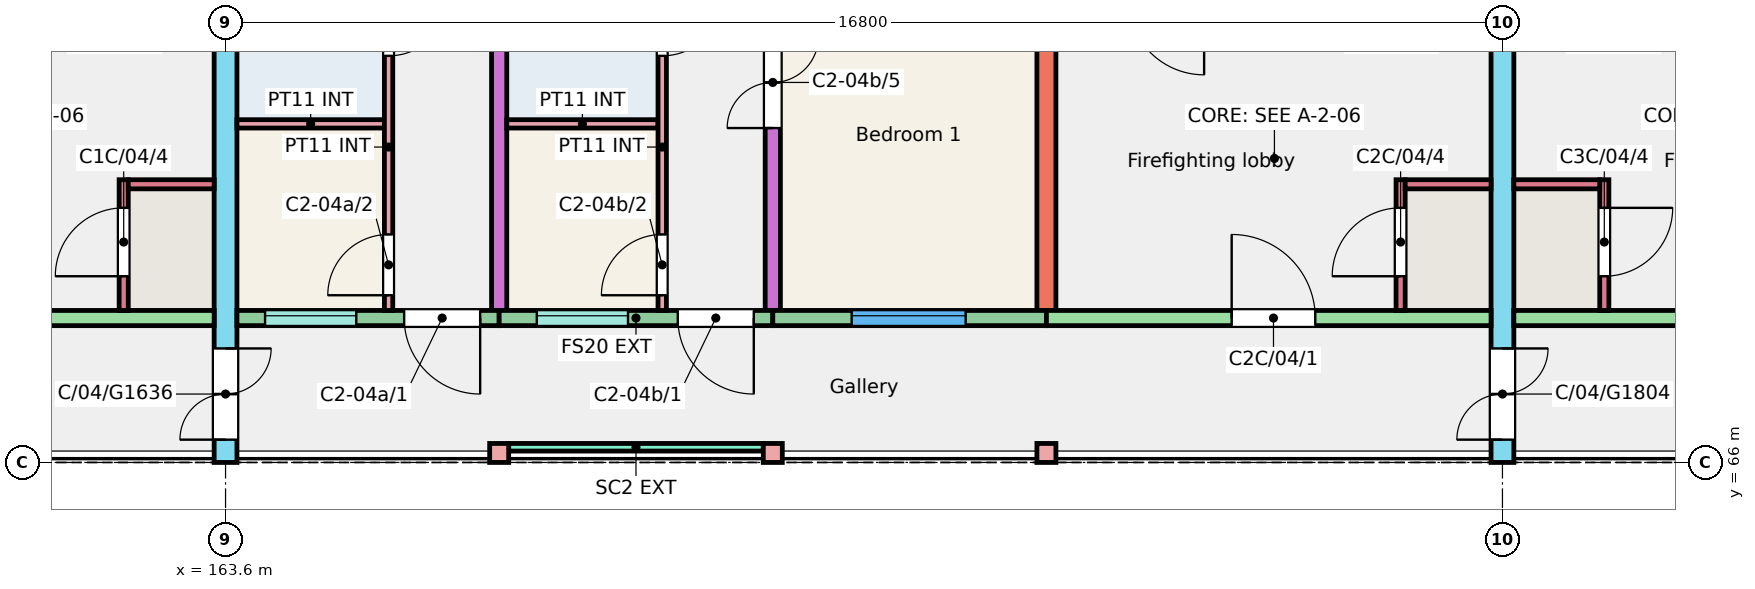
"""IFC4 building model, lengths in metres.
Left out: names, types, materials, properties, quantities, classifications, styles, units other than length and angle.
Written with IfcOpenShell. Run it as: python <this file> out.ifc"""

import sys

from ifc_helpers import new_model, si_unit, direction, frame, frame_2d, origin, origin_2d, place, context, subcontext, project, spatial, rectangle, extrude, element, fill, save


model = new_model("IFC4")
c1 = context("Model", 3, precision=1e-05, world=origin(), true_north=direction((0.0, 1.0)))
c2 = subcontext(c1, "Body", "Model", "MODEL_VIEW")
j1 = project(units=[si_unit("LENGTHUNIT", "METRE"), si_unit("PLANEANGLEUNIT", "RADIAN")], contexts=[c1])
p1 = place(None, origin())
s1 = spatial("IfcSite", under=j1, at=p1, CompositionType="ELEMENT")
p2 = place(p1, origin())
s2 = spatial("IfcBuilding", under=s1, at=p2, CompositionType="ELEMENT")
p3 = place(p2, frame((0.0, 0.0, 12.0)))
s3 = spatial("IfcBuildingStorey", under=s2, at=p3, CompositionType="ELEMENT", Elevation=12.0)
p4 = place(p3, frame((163.6, 66.0, 0.0), z_axis=(0.0, 0.0, 1.0), x_axis=(0.0, 1.0, 0.0)))
e1 = element("IfcWall", 1, at=p4, inside=s3, PredefinedType="SHEAR", context=c2, shape_type="SweptSolid", body=[
    extrude(rectangle(XDim=11.0, YDim=0.3, at=frame_2d((5.5, 0.0))), origin(), (0.0, 0.0, 1.0), 3.0),
])
p5 = place(p4, frame((0.3, 0.0, 0.0)))
e2 = element("IfcOpeningElement", 2, at=p5, cuts=e1, PredefinedType="OPENING", context=c2, shape_type="SweptSolid", body=[
    extrude(rectangle(XDim=1.2, YDim=2.1, at=frame_2d((0.6, 1.05))), frame((0.0, 0.16, 0.0), z_axis=(0.0, -1.0, 0.0), x_axis=(1.0, 0.0, 0.0)), (0.0, 0.0, 1.0), 0.32),
])
p6 = place(p3, frame((167.2, 68.0, 0.0), z_axis=(0.0, 0.0, 1.0), x_axis=(0.0, 1.0, 0.0)))
e3 = element("IfcWall", 3, at=p6, inside=s3, PredefinedType="SHEAR", context=c2, shape_type="SweptSolid", body=[
    extrude(rectangle(XDim=9.0, YDim=0.2, at=frame_2d((4.5, 0.0))), origin(), (0.0, 0.0, 1.0), 3.0),
])
p7 = place(p3, frame((170.8, 68.0, 0.0), z_axis=(0.0, 0.0, 1.0), x_axis=(0.0, 1.0, 0.0)))
e4 = element("IfcWall", 4, at=p7, inside=s3, PredefinedType="SHEAR", context=c2, shape_type="SweptSolid", body=[
    extrude(rectangle(XDim=9.0, YDim=0.2, at=frame_2d((4.5, 0.0))), origin(), (0.0, 0.0, 1.0), 3.0),
])
p8 = place(p7, frame((2.4, 0.0, 0.0)))
e5 = element("IfcOpeningElement", 5, at=p8, cuts=e4, PredefinedType="OPENING", context=c2, shape_type="SweptSolid", body=[
    extrude(rectangle(XDim=1.2, YDim=2.1, at=frame_2d((0.6, 1.05))), frame((0.0, 0.11, 0.0), z_axis=(0.0, -1.0, 0.0), x_axis=(1.0, 0.0, 0.0)), (0.0, 0.0, 1.0), 0.22),
])
p9 = place(p7, frame((6.4, 0.0, 0.0)))
e6 = element("IfcOpeningElement", 6, at=p9, cuts=e4, PredefinedType="OPENING", context=c2, shape_type="SweptSolid", body=[
    extrude(rectangle(XDim=1.2, YDim=2.1, at=frame_2d((0.6, 1.05))), frame((0.0, 0.11, 0.0), z_axis=(0.0, -1.0, 0.0), x_axis=(1.0, 0.0, 0.0)), (0.0, 0.0, 1.0), 0.22),
])
p10 = place(p3, frame((174.4, 68.0, 0.0), z_axis=(0.0, 0.0, 1.0), x_axis=(0.0, 1.0, 0.0)))
e7 = element("IfcWall", 7, at=p10, inside=s3, PredefinedType="SHEAR", context=c2, shape_type="SweptSolid", body=[
    extrude(rectangle(XDim=9.0, YDim=0.25, at=frame_2d((4.5, 0.0))), origin(), (0.0, 0.0, 1.0), 3.0),
])
p11 = place(p3, frame((180.4, 66.0, 0.0), z_axis=(0.0, 0.0, 1.0), x_axis=(0.0, 1.0, 0.0)))
e8 = element("IfcWall", 8, at=p11, inside=s3, PredefinedType="SHEAR", context=c2, shape_type="SweptSolid", body=[
    extrude(rectangle(XDim=11.0, YDim=0.3, at=frame_2d((5.5, 0.0))), origin(), (0.0, 0.0, 1.0), 3.0),
])
p12 = place(p11, frame((0.3, 0.0, 0.0)))
e9 = element("IfcOpeningElement", 9, at=p12, cuts=e8, PredefinedType="OPENING", context=c2, shape_type="SweptSolid", body=[
    extrude(rectangle(XDim=1.2, YDim=2.1, at=frame_2d((0.6, 1.05))), frame((0.0, 0.16, 0.0), z_axis=(0.0, -1.0, 0.0), x_axis=(1.0, 0.0, 0.0)), (0.0, 0.0, 1.0), 0.32),
])
p13 = place(p3, frame((157.6, 67.9, 0.0), z_axis=(0.0, 0.0, 1.0), x_axis=(1.0, 0.0, 0.0)))
e10 = element("IfcWall", 10, at=p13, inside=s3, PredefinedType="SHEAR", context=c2, shape_type="SweptSolid", body=[
    extrude(rectangle(XDim=5.85, YDim=0.2, at=frame_2d((2.925, 0.0))), origin(), (0.0, 0.0, 1.0), 3.0),
])
p14 = place(p13, frame((2.438, 0.0, 0.0)))
e11 = element("IfcOpeningElement", 11, at=p14, cuts=e10, PredefinedType="OPENING", context=c2, shape_type="SweptSolid", body=[
    extrude(rectangle(XDim=1.1, YDim=2.1, at=frame_2d((0.55, 1.05))), frame((0.0, 0.11, 0.0), z_axis=(0.0, -1.0, 0.0), x_axis=(1.0, 0.0, 0.0)), (0.0, 0.0, 1.0), 0.22),
])
p15 = place(p3, frame((162.26, 68.0, 0.0), z_axis=(0.0, 0.0, 1.0), x_axis=(0.0, 1.0, 0.0)))
e12 = element("IfcWall", 12, at=p15, inside=s3, PredefinedType="SHEAR", context=c2, shape_type="SweptSolid", body=[
    extrude(rectangle(XDim=1.72, YDim=0.12, at=frame_2d((0.86, 0.0))), origin(), (0.0, 0.0, 1.0), 3.0),
])
p16 = place(p15, frame((0.45, 0.0, 0.0)))
e13 = element("IfcOpeningElement", 13, at=p16, cuts=e12, PredefinedType="OPENING", context=c2, shape_type="SweptSolid", body=[
    extrude(rectangle(XDim=0.9, YDim=2.1, at=frame_2d((0.45, 1.05))), frame((0.0, 0.07, 0.0), z_axis=(0.0, -1.0, 0.0), x_axis=(1.0, 0.0, 0.0)), (0.0, 0.0, 1.0), 0.14),
])
p17 = place(p3, frame((162.32, 69.66, 0.0), z_axis=(0.0, 0.0, 1.0), x_axis=(1.0, 0.0, 0.0)))
e14 = element("IfcWall", 14, at=p17, inside=s3, PredefinedType="SHEAR", context=c2, shape_type="SweptSolid", body=[
    extrude(rectangle(XDim=1.13, YDim=0.12, at=frame_2d((0.565, 0.0))), origin(), (0.0, 0.0, 1.0), 3.0),
])
p18 = place(p3, frame((163.75, 67.9, 0.0), z_axis=(0.0, 0.0, 1.0), x_axis=(1.0, 0.0, 0.0)))
e15 = element("IfcWall", 15, at=p18, inside=s3, PredefinedType="SOLIDWALL", context=c2, shape_type="SweptSolid", body=[
    extrude(rectangle(XDim=3.45, YDim=0.2, at=frame_2d((1.725, 0.0))), origin(), (0.0, 0.0, 1.0), 3.0),
])
p19 = place(p18, frame((0.37, 0.0, 1.1)))
e16 = element("IfcOpeningElement", 16, at=p19, cuts=e15, PredefinedType="OPENING", context=c2, shape_type="SweptSolid", body=[
    extrude(rectangle(XDim=1.2, YDim=1.3, at=frame_2d((0.6, 0.65))), frame((0.0, 0.11, 0.0), z_axis=(0.0, -1.0, 0.0), x_axis=(1.0, 0.0, 0.0)), (0.0, 0.0, 1.0), 0.22),
])
p20 = place(p18, frame((2.2, 0.0, 0.0)))
e17 = element("IfcOpeningElement", 17, at=p20, cuts=e15, PredefinedType="OPENING", context=c2, shape_type="SweptSolid", body=[
    extrude(rectangle(XDim=1.0, YDim=2.1, at=frame_2d((0.5, 1.05))), frame((0.0, 0.11, 0.0), z_axis=(0.0, -1.0, 0.0), x_axis=(1.0, 0.0, 0.0)), (0.0, 0.0, 1.0), 0.22),
])
p21 = place(p3, frame((167.2, 67.9, 0.0), z_axis=(0.0, 0.0, 1.0), x_axis=(1.0, 0.0, 0.0)))
e18 = element("IfcWall", 18, at=p21, inside=s3, PredefinedType="SOLIDWALL", context=c2, shape_type="SweptSolid", body=[
    extrude(rectangle(XDim=3.6, YDim=0.2, at=frame_2d((1.8, 0.0))), origin(), (0.0, 0.0, 1.0), 3.0),
])
p22 = place(p21, frame((0.495, 0.0, 1.1)))
e19 = element("IfcOpeningElement", 19, at=p22, cuts=e18, PredefinedType="OPENING", context=c2, shape_type="SweptSolid", body=[
    extrude(rectangle(XDim=1.2, YDim=1.3, at=frame_2d((0.6, 0.65))), frame((0.0, 0.11, 0.0), z_axis=(0.0, -1.0, 0.0), x_axis=(1.0, 0.0, 0.0)), (0.0, 0.0, 1.0), 0.22),
])
p23 = place(p21, frame((2.35, 0.0, 0.0)))
e20 = element("IfcOpeningElement", 20, at=p23, cuts=e18, PredefinedType="OPENING", context=c2, shape_type="SweptSolid", body=[
    extrude(rectangle(XDim=1.0, YDim=2.1, at=frame_2d((0.5, 1.05))), frame((0.0, 0.11, 0.0), z_axis=(0.0, -1.0, 0.0), x_axis=(1.0, 0.0, 0.0)), (0.0, 0.0, 1.0), 0.22),
])
p24 = place(p3, frame((170.8, 67.9, 0.0), z_axis=(0.0, 0.0, 1.0), x_axis=(1.0, 0.0, 0.0)))
e21 = element("IfcWall", 21, at=p24, inside=s3, PredefinedType="SOLIDWALL", context=c2, shape_type="SweptSolid", body=[
    extrude(rectangle(XDim=3.6, YDim=0.2, at=frame_2d((1.8, 0.0))), origin(), (0.0, 0.0, 1.0), 3.0),
])
p25 = place(p24, frame((1.038, 0.0, 0.9)))
e22 = element("IfcOpeningElement", 22, at=p25, cuts=e21, PredefinedType="OPENING", context=c2, shape_type="SweptSolid", body=[
    extrude(rectangle(XDim=1.5, YDim=1.5, at=frame_2d((0.75, 0.75))), frame((0.0, 0.11, 0.0), z_axis=(0.0, -1.0, 0.0), x_axis=(1.0, 0.0, 0.0)), (0.0, 0.0, 1.0), 0.22),
])
p26 = place(p3, frame((174.4, 67.9, 0.0), z_axis=(0.0, 0.0, 1.0), x_axis=(1.0, 0.0, 0.0)))
e23 = element("IfcWall", 23, at=p26, inside=s3, PredefinedType="SHEAR", context=c2, shape_type="SweptSolid", body=[
    extrude(rectangle(XDim=5.85, YDim=0.2, at=frame_2d((2.925, 0.0))), origin(), (0.0, 0.0, 1.0), 3.0),
])
p27 = place(p26, frame((2.438, 0.0, 0.0)))
e24 = element("IfcOpeningElement", 24, at=p27, cuts=e23, PredefinedType="OPENING", context=c2, shape_type="SweptSolid", body=[
    extrude(rectangle(XDim=1.1, YDim=2.1, at=frame_2d((0.55, 1.05))), frame((0.0, 0.11, 0.0), z_axis=(0.0, -1.0, 0.0), x_axis=(1.0, 0.0, 0.0)), (0.0, 0.0, 1.0), 0.22),
])
p28 = place(p3, frame((179.06, 68.0, 0.0), z_axis=(0.0, 0.0, 1.0), x_axis=(0.0, 1.0, 0.0)))
e25 = element("IfcWall", 25, at=p28, inside=s3, PredefinedType="SHEAR", context=c2, shape_type="SweptSolid", body=[
    extrude(rectangle(XDim=1.72, YDim=0.12, at=frame_2d((0.86, 0.0))), origin(), (0.0, 0.0, 1.0), 3.0),
])
p29 = place(p28, frame((0.45, 0.0, 0.0)))
e26 = element("IfcOpeningElement", 26, at=p29, cuts=e25, PredefinedType="OPENING", context=c2, shape_type="SweptSolid", body=[
    extrude(rectangle(XDim=0.9, YDim=2.1, at=frame_2d((0.45, 1.05))), frame((0.0, 0.07, 0.0), z_axis=(0.0, -1.0, 0.0), x_axis=(1.0, 0.0, 0.0)), (0.0, 0.0, 1.0), 0.14),
])
p30 = place(p3, frame((179.12, 69.66, 0.0), z_axis=(0.0, 0.0, 1.0), x_axis=(1.0, 0.0, 0.0)))
e27 = element("IfcWall", 27, at=p30, inside=s3, PredefinedType="SHEAR", context=c2, shape_type="SweptSolid", body=[
    extrude(rectangle(XDim=1.13, YDim=0.12, at=frame_2d((0.565, 0.0))), origin(), (0.0, 0.0, 1.0), 3.0),
])
p31 = place(p3, frame((180.55, 67.9, 0.0), z_axis=(0.0, 0.0, 1.0), x_axis=(1.0, 0.0, 0.0)))
e28 = element("IfcWall", 28, at=p31, inside=s3, PredefinedType="SHEAR", context=c2, shape_type="SweptSolid", body=[
    extrude(rectangle(XDim=5.85, YDim=0.2, at=frame_2d((2.925, 0.0))), origin(), (0.0, 0.0, 1.0), 3.0),
])
p32 = place(p31, frame((2.312, 0.0, 0.0)))
e29 = element("IfcOpeningElement", 29, at=p32, cuts=e28, PredefinedType="OPENING", context=c2, shape_type="SweptSolid", body=[
    extrude(rectangle(XDim=1.1, YDim=2.1, at=frame_2d((0.55, 1.05))), frame((0.0, 0.11, 0.0), z_axis=(0.0, -1.0, 0.0), x_axis=(1.0, 0.0, 0.0)), (0.0, 0.0, 1.0), 0.22),
])
p33 = place(p3, frame((181.74, 68.0, 0.0), z_axis=(0.0, 0.0, 1.0), x_axis=(0.0, 1.0, 0.0)))
e30 = element("IfcWall", 30, at=p33, inside=s3, PredefinedType="SHEAR", context=c2, shape_type="SweptSolid", body=[
    extrude(rectangle(XDim=1.72, YDim=0.12, at=frame_2d((0.86, 0.0))), origin(), (0.0, 0.0, 1.0), 3.0),
])
p34 = place(p33, frame((0.45, 0.0, 0.0)))
e31 = element("IfcOpeningElement", 31, at=p34, cuts=e30, PredefinedType="OPENING", context=c2, shape_type="SweptSolid", body=[
    extrude(rectangle(XDim=0.9, YDim=2.1, at=frame_2d((0.45, 1.05))), frame((0.0, 0.07, 0.0), z_axis=(0.0, -1.0, 0.0), x_axis=(1.0, 0.0, 0.0)), (0.0, 0.0, 1.0), 0.14),
])
p35 = place(p3, frame((180.55, 69.66, 0.0), z_axis=(0.0, 0.0, 1.0), x_axis=(1.0, 0.0, 0.0)))
e32 = element("IfcWall", 32, at=p35, inside=s3, PredefinedType="SHEAR", context=c2, shape_type="SweptSolid", body=[
    extrude(rectangle(XDim=1.13, YDim=0.12, at=frame_2d((0.565, 0.0))), origin(), (0.0, 0.0, 1.0), 3.0),
])
for number, where, z_axis, x_axis in (
    (33, (167.2, 66.125, 0.0), (0.0, 0.0, 1.0), (1.0, 0.0, 0.0)),
    (34, (170.8, 66.125, 0.0), (0.0, 0.0, 1.0), (1.0, 0.0, 0.0)),
    (35, (174.4, 66.125, 0.0), (0.0, 0.0, 1.0), (1.0, 0.0, 0.0)),
):
    element("IfcColumn", number, at=place(p3, frame(where, z_axis=z_axis, x_axis=x_axis)), inside=s3, PredefinedType="COLUMN", context=c2, shape_type="SweptSolid", body=[
        extrude(rectangle(XDim=0.25, YDim=0.25, at=origin_2d()), origin(), (0.0, 0.0, 1.0), 3.0),
    ])
p36 = place(p3, frame((167.325, 66.2, 0.0), z_axis=(0.0, 0.0, 1.0), x_axis=(1.0, 0.0, 0.0)))
e36 = element("IfcWall", 36, at=p36, inside=s3, PredefinedType="SOLIDWALL", context=c2, shape_type="SweptSolid", body=[
    extrude(rectangle(XDim=3.35, YDim=0.1, at=frame_2d((1.675, 0.0))), origin(), (0.0, 0.0, 1.0), 2.45),
])
p37 = place(p3, frame((163.75, 70.455, 0.0), z_axis=(0.0, 0.0, 1.0), x_axis=(1.0, 0.0, 0.0)))
e37 = element("IfcWall", 37, at=p37, inside=s3, PredefinedType="PARTITIONING", context=c2, shape_type="SweptSolid", body=[
    extrude(rectangle(XDim=1.94, YDim=0.11, at=frame_2d((0.97, 0.0))), origin(), (0.0, 0.0, 1.0), 2.8),
])
p38 = place(p3, frame((165.745, 68.0, 0.0), z_axis=(0.0, 0.0, 1.0), x_axis=(0.0, 1.0, 0.0)))
e38 = element("IfcWall", 38, at=p38, inside=s3, PredefinedType="PARTITIONING", context=c2, shape_type="SweptSolid", body=[
    extrude(rectangle(XDim=4.3, YDim=0.11, at=frame_2d((2.15, 0.0))), origin(), (0.0, 0.0, 1.0), 2.8),
])
p39 = place(p38, frame((0.2, 0.0, 0.0)))
e39 = element("IfcOpeningElement", 39, at=p39, cuts=e38, PredefinedType="OPENING", context=c2, shape_type="SweptSolid", body=[
    extrude(rectangle(XDim=0.8, YDim=2.1, at=frame_2d((0.4, 1.05))), frame((0.0, 0.065, 0.0), z_axis=(0.0, -1.0, 0.0), x_axis=(1.0, 0.0, 0.0)), (0.0, 0.0, 1.0), 0.13),
])
p40 = place(p38, frame((3.35, 0.0, 0.0)))
e40 = element("IfcOpeningElement", 40, at=p40, cuts=e38, PredefinedType="OPENING", context=c2, shape_type="SweptSolid", body=[
    extrude(rectangle(XDim=0.8, YDim=2.1, at=frame_2d((0.4, 1.05))), frame((0.0, 0.065, 0.0), z_axis=(0.0, -1.0, 0.0), x_axis=(1.0, 0.0, 0.0)), (0.0, 0.0, 1.0), 0.13),
])
p41 = place(p3, frame((167.3, 70.455, 0.0), z_axis=(0.0, 0.0, 1.0), x_axis=(1.0, 0.0, 0.0)))
e41 = element("IfcWall", 41, at=p41, inside=s3, PredefinedType="PARTITIONING", context=c2, shape_type="SweptSolid", body=[
    extrude(rectangle(XDim=1.99, YDim=0.11, at=frame_2d((0.995, 0.0))), origin(), (0.0, 0.0, 1.0), 2.8),
])
p42 = place(p3, frame((169.345, 68.0, 0.0), z_axis=(0.0, 0.0, 1.0), x_axis=(0.0, 1.0, 0.0)))
e42 = element("IfcWall", 42, at=p42, inside=s3, PredefinedType="PARTITIONING", context=c2, shape_type="SweptSolid", body=[
    extrude(rectangle(XDim=4.3, YDim=0.11, at=frame_2d((2.15, 0.0))), origin(), (0.0, 0.0, 1.0), 2.8),
])
p43 = place(p42, frame((0.2, 0.0, 0.0)))
e43 = element("IfcOpeningElement", 43, at=p43, cuts=e42, PredefinedType="OPENING", context=c2, shape_type="SweptSolid", body=[
    extrude(rectangle(XDim=0.8, YDim=2.1, at=frame_2d((0.4, 1.05))), frame((0.0, 0.065, 0.0), z_axis=(0.0, -1.0, 0.0), x_axis=(1.0, 0.0, 0.0)), (0.0, 0.0, 1.0), 0.13),
])
p44 = place(p42, frame((3.35, 0.0, 0.0)))
e44 = element("IfcOpeningElement", 44, at=p44, cuts=e42, PredefinedType="OPENING", context=c2, shape_type="SweptSolid", body=[
    extrude(rectangle(XDim=0.8, YDim=2.1, at=frame_2d((0.4, 1.05))), frame((0.0, 0.065, 0.0), z_axis=(0.0, -1.0, 0.0), x_axis=(1.0, 0.0, 0.0)), (0.0, 0.0, 1.0), 0.13),
])
p45 = place(p19, origin())
e45 = element("IfcWindow", 45, at=p45, inside=s3, PartitioningType="SINGLE_PANEL", PredefinedType="WINDOW", context=c2, shape_type="SweptSolid", body=[
    extrude(rectangle(XDim=1.2, YDim=1.3, at=frame_2d((0.6, 0.65))), frame((0.0, 0.06, 0.0), z_axis=(0.0, -1.0, 0.0), x_axis=(1.0, 0.0, 0.0)), (0.0, 0.0, 1.0), 0.06),
])
fill(e16, e45)
p46 = place(p25, origin())
e46 = element("IfcWindow", 46, at=p46, inside=s3, PartitioningType="SINGLE_PANEL", PredefinedType="WINDOW", context=c2, shape_type="SweptSolid", body=[
    extrude(rectangle(XDim=1.5, YDim=1.5, at=frame_2d((0.75, 0.75))), frame((0.0, 0.06, 0.0), z_axis=(0.0, -1.0, 0.0), x_axis=(1.0, 0.0, 0.0)), (0.0, 0.0, 1.0), 0.06),
])
fill(e22, e46)
p47 = place(p22, origin())
e47 = element("IfcWindow", 47, at=p47, inside=s3, PartitioningType="SINGLE_PANEL", PredefinedType="WINDOW", context=c2, shape_type="SweptSolid", body=[
    extrude(rectangle(XDim=1.2, YDim=1.3, at=frame_2d((0.6, 0.65))), frame((0.0, 0.06, 0.0), z_axis=(0.0, -1.0, 0.0), x_axis=(1.0, 0.0, 0.0)), (0.0, 0.0, 1.0), 0.06),
])
fill(e19, e47)
p48 = place(p20, origin())
e48 = element("IfcDoor", 48, at=p48, inside=s3, OperationType="SINGLE_SWING_RIGHT", PredefinedType="DOOR", context=c2, shape_type="SweptSolid", body=[
    extrude(rectangle(XDim=1.0, YDim=2.1, at=frame_2d((0.5, 1.05))), frame((0.0, 0.025, 0.0), z_axis=(0.0, -1.0, 0.0), x_axis=(1.0, 0.0, 0.0)), (0.0, 0.0, 1.0), 0.05),
])
fill(e17, e48)
p49 = place(p39, origin())
e49 = element("IfcDoor", 49, at=p49, inside=s3, OperationType="SINGLE_SWING_LEFT", PredefinedType="DOOR", context=c2, shape_type="SweptSolid", body=[
    extrude(rectangle(XDim=0.8, YDim=2.1, at=frame_2d((0.4, 1.05))), frame((0.0, 0.025, 0.0), z_axis=(0.0, -1.0, 0.0), x_axis=(1.0, 0.0, 0.0)), (0.0, 0.0, 1.0), 0.05),
])
fill(e39, e49)
p50 = place(p40, origin())
e50 = element("IfcDoor", 50, at=p50, inside=s3, OperationType="SINGLE_SWING_RIGHT", PredefinedType="DOOR", context=c2, shape_type="SweptSolid", body=[
    extrude(rectangle(XDim=0.8, YDim=2.1, at=frame_2d((0.4, 1.05))), frame((0.0, 0.025, 0.0), z_axis=(0.0, -1.0, 0.0), x_axis=(1.0, 0.0, 0.0)), (0.0, 0.0, 1.0), 0.05),
])
fill(e40, e50)
p51 = place(p23, origin())
e51 = element("IfcDoor", 51, at=p51, inside=s3, OperationType="SINGLE_SWING_RIGHT", PredefinedType="DOOR", context=c2, shape_type="SweptSolid", body=[
    extrude(rectangle(XDim=1.0, YDim=2.1, at=frame_2d((0.5, 1.05))), frame((0.0, 0.025, 0.0), z_axis=(0.0, -1.0, 0.0), x_axis=(1.0, 0.0, 0.0)), (0.0, 0.0, 1.0), 0.05),
])
fill(e20, e51)
p52 = place(p43, origin())
e52 = element("IfcDoor", 52, at=p52, inside=s3, OperationType="SINGLE_SWING_LEFT", PredefinedType="DOOR", context=c2, shape_type="SweptSolid", body=[
    extrude(rectangle(XDim=0.8, YDim=2.1, at=frame_2d((0.4, 1.05))), frame((0.0, 0.025, 0.0), z_axis=(0.0, -1.0, 0.0), x_axis=(1.0, 0.0, 0.0)), (0.0, 0.0, 1.0), 0.05),
])
fill(e43, e52)
p53 = place(p44, origin())
e53 = element("IfcDoor", 53, at=p53, inside=s3, OperationType="SINGLE_SWING_RIGHT", PredefinedType="DOOR", context=c2, shape_type="SweptSolid", body=[
    extrude(rectangle(XDim=0.8, YDim=2.1, at=frame_2d((0.4, 1.05))), frame((0.0, 0.025, 0.0), z_axis=(0.0, -1.0, 0.0), x_axis=(1.0, 0.0, 0.0)), (0.0, 0.0, 1.0), 0.05),
])
fill(e44, e53)
p54 = place(p8, origin())
e54 = element("IfcDoor", 54, at=p54, inside=s3, OperationType="DOUBLE_DOOR_SINGLE_SWING", PredefinedType="DOOR", context=c2, shape_type="SweptSolid", body=[
    extrude(rectangle(XDim=1.2, YDim=2.1, at=frame_2d((0.6, 1.05))), frame((0.0, 0.025, 0.0), z_axis=(0.0, -1.0, 0.0), x_axis=(1.0, 0.0, 0.0)), (0.0, 0.0, 1.0), 0.05),
])
fill(e5, e54)
p55 = place(p16, origin())
e55 = element("IfcDoor", 55, at=p55, inside=s3, OperationType="SINGLE_SWING_LEFT", PredefinedType="DOOR", context=c2, shape_type="SweptSolid", body=[
    extrude(rectangle(XDim=0.9, YDim=2.1, at=frame_2d((0.45, 1.05))), frame((0.0, 0.025, 0.0), z_axis=(0.0, -1.0, 0.0), x_axis=(1.0, 0.0, 0.0)), (0.0, 0.0, 1.0), 0.05),
])
fill(e13, e55)
p56 = place(p27, origin())
e56 = element("IfcDoor", 56, at=p56, inside=s3, OperationType="SINGLE_SWING_LEFT", PredefinedType="DOOR", context=c2, shape_type="SweptSolid", body=[
    extrude(rectangle(XDim=1.1, YDim=2.1, at=frame_2d((0.55, 1.05))), frame((0.0, 0.025, 0.0), z_axis=(0.0, -1.0, 0.0), x_axis=(1.0, 0.0, 0.0)), (0.0, 0.0, 1.0), 0.05),
])
fill(e24, e56)
p57 = place(p29, origin())
e57 = element("IfcDoor", 57, at=p57, inside=s3, OperationType="SINGLE_SWING_LEFT", PredefinedType="DOOR", context=c2, shape_type="SweptSolid", body=[
    extrude(rectangle(XDim=0.9, YDim=2.1, at=frame_2d((0.45, 1.05))), frame((0.0, 0.025, 0.0), z_axis=(0.0, -1.0, 0.0), x_axis=(1.0, 0.0, 0.0)), (0.0, 0.0, 1.0), 0.05),
])
fill(e26, e57)
p58 = place(p34, origin())
e58 = element("IfcDoor", 58, at=p58, inside=s3, OperationType="SINGLE_SWING_RIGHT", PredefinedType="DOOR", context=c2, shape_type="SweptSolid", body=[
    extrude(rectangle(XDim=0.9, YDim=2.1, at=frame_2d((0.45, 1.05))), frame((0.0, 0.025, 0.0), z_axis=(0.0, -1.0, 0.0), x_axis=(1.0, 0.0, 0.0)), (0.0, 0.0, 1.0), 0.05),
])
fill(e31, e58)
p59 = place(p5, origin())
e59 = element("IfcDoor", 59, at=p59, inside=s3, OperationType="DOUBLE_DOOR_SINGLE_SWING", PredefinedType="DOOR", context=c2, shape_type="SweptSolid", body=[
    extrude(rectangle(XDim=1.2, YDim=2.1, at=frame_2d((0.6, 1.05))), frame((0.0, 0.025, 0.0), z_axis=(0.0, -1.0, 0.0), x_axis=(1.0, 0.0, 0.0)), (0.0, 0.0, 1.0), 0.05),
])
fill(e2, e59)
p60 = place(p12, origin())
e60 = element("IfcDoor", 60, at=p60, inside=s3, OperationType="DOUBLE_DOOR_SINGLE_SWING", PredefinedType="DOOR", context=c2, shape_type="SweptSolid", body=[
    extrude(rectangle(XDim=1.2, YDim=2.1, at=frame_2d((0.6, 1.05))), frame((0.0, 0.025, 0.0), z_axis=(0.0, -1.0, 0.0), x_axis=(1.0, 0.0, 0.0)), (0.0, 0.0, 1.0), 0.05),
])
fill(e9, e60)
save(model, sys.argv[1])
